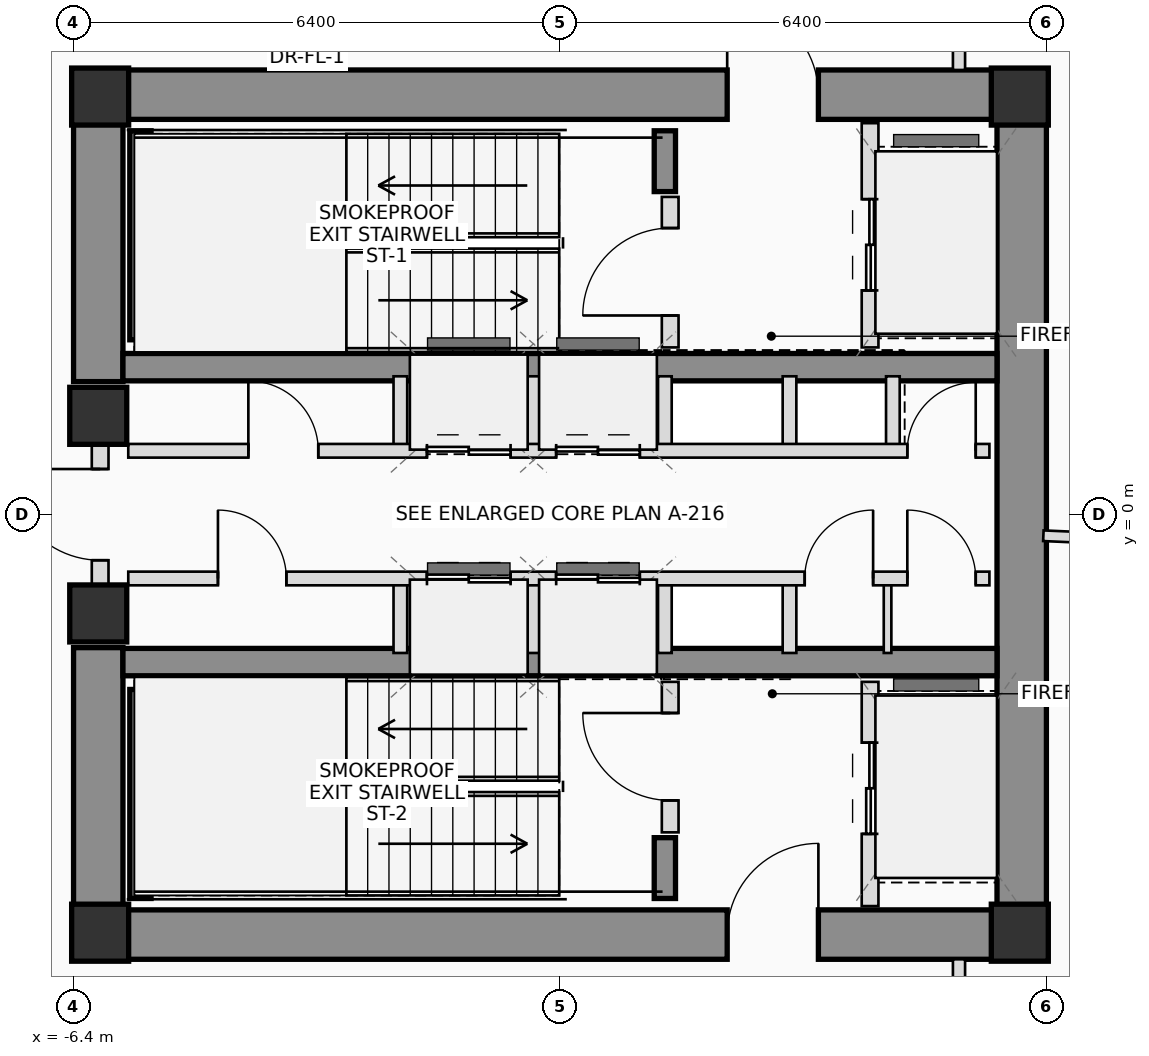
"""IFC4 building model, lengths in metres.
Left out: names, types, materials, properties, quantities, classifications, styles, units other than length and angle.
Written with IfcOpenShell. Run it as: python <this file> out.ifc"""

import sys

from ifc_helpers import new_model, si_unit, direction, frame, frame_2d, origin, origin_2d, place, context, subcontext, project, spatial, rectangle, extrude, source, transform, mapped, element, fill, save


model = new_model("IFC4")
c1 = context("Model", 3, precision=1e-05, world=origin(), true_north=direction((0.0, 1.0)))
c2 = subcontext(c1, "Body", "Model", "MODEL_VIEW")
j1 = project(units=[si_unit("LENGTHUNIT", "METRE"), si_unit("PLANEANGLEUNIT", "RADIAN")], contexts=[c1])
p1 = place(None, origin())
s1 = spatial("IfcSite", under=j1, at=p1, CompositionType="ELEMENT")
p2 = place(p1, origin())
s2 = spatial("IfcBuilding", under=s1, at=p2, CompositionType="ELEMENT")
p3 = place(p2, frame((0.0, 0.0, 172.55)))
s3 = spatial("IfcBuildingStorey", under=s2, at=p3, CompositionType="ELEMENT", Elevation=172.55)
m1 = source(origin(), c2, "Body", "SweptSolid", [
    extrude(rectangle(XDim=0.75, YDim=0.75, at=origin_2d()), origin(), (0.0, 0.0, 1.0), 3.45),
])
for number, where, z_axis, x_axis in (
    (1, (-6.05, -5.5, 0.0), (0.0, 0.0, 1.0), (1.0, 0.0, 0.0)),
    (2, (6.05, -5.5, 0.0), (0.0, 0.0, 1.0), (1.0, 0.0, 0.0)),
    (3, (6.05, 5.5, 0.0), (0.0, 0.0, 1.0), (1.0, 0.0, 0.0)),
    (4, (-6.05, 5.5, 0.0), (0.0, 0.0, 1.0), (1.0, 0.0, 0.0)),
):
    element("IfcColumn", number, at=place(p3, frame(where, z_axis=z_axis, x_axis=x_axis)), inside=s3, PredefinedType="COLUMN", context=c2, shape_type="MappedRepresentation", body=[
        mapped(m1, transform((0.0, 0.0, 0.0), scale=1.0)),
    ])
p4 = place(p3, frame((-6.4, 5.525, 0.0), z_axis=(0.0, 0.0, 1.0), x_axis=(1.0, 0.0, 0.0)))
e5 = element("IfcWall", 5, at=p4, inside=s3, PredefinedType="SHEAR", context=c2, shape_type="SweptSolid", body=[
    extrude(rectangle(XDim=12.8, YDim=0.65, at=frame_2d((6.4, 0.0))), origin(), (0.0, 0.0, 1.0), 3.45),
])
p5 = place(p4, frame((8.6, 0.0, 0.0)))
e6 = element("IfcOpeningElement", 6, at=p5, cuts=e5, PredefinedType="OPENING", context=c2, shape_type="SweptSolid", body=[
    extrude(rectangle(XDim=1.2, YDim=2.2, at=frame_2d((0.6, 1.1))), frame((0.0, 0.335, 0.0), z_axis=(0.0, -1.0, 0.0), x_axis=(1.0, 0.0, 0.0)), (0.0, 0.0, 1.0), 0.67),
])
p6 = place(p3, frame((-6.4, -5.525, 0.0), z_axis=(0.0, 0.0, 1.0), x_axis=(1.0, 0.0, 0.0)))
e7 = element("IfcWall", 7, at=p6, inside=s3, PredefinedType="SHEAR", context=c2, shape_type="SweptSolid", body=[
    extrude(rectangle(XDim=12.8, YDim=0.65, at=frame_2d((6.4, 0.0))), origin(), (0.0, 0.0, 1.0), 3.45),
])
p7 = place(p6, frame((8.6, 0.0, 0.0)))
e8 = element("IfcOpeningElement", 8, at=p7, cuts=e7, PredefinedType="OPENING", context=c2, shape_type="SweptSolid", body=[
    extrude(rectangle(XDim=1.2, YDim=2.2, at=frame_2d((0.6, 1.1))), frame((0.0, 0.335, 0.0), z_axis=(0.0, -1.0, 0.0), x_axis=(1.0, 0.0, 0.0)), (0.0, 0.0, 1.0), 0.67),
])
p8 = place(p3, frame((6.075, -5.2, 0.0), z_axis=(0.0, 0.0, 1.0), x_axis=(0.0, 1.0, 0.0)))
e9 = element("IfcWall", 9, at=p8, inside=s3, PredefinedType="SHEAR", context=c2, shape_type="SweptSolid", body=[
    extrude(rectangle(XDim=10.4, YDim=0.65, at=frame_2d((5.2, 0.0))), origin(), (0.0, 0.0, 1.0), 3.45),
])
for number, where, z_axis, x_axis in (
    (10, (-6.075, -5.2, 0.0), (0.0, 0.0, 1.0), (0.0, 1.0, 0.0)),
    (11, (-6.075, 1.75, 0.0), (0.0, 0.0, 1.0), (0.0, 1.0, 0.0)),
):
    element("IfcWall", number, at=place(p3, frame(where, z_axis=z_axis, x_axis=x_axis)), inside=s3, PredefinedType="SHEAR", context=c2, shape_type="SweptSolid", body=[
        extrude(rectangle(XDim=3.45, YDim=0.65, at=frame_2d((1.725, 0.0))), origin(), (0.0, 0.0, 1.0), 3.45),
    ])
for number, where, z_axis, x_axis in (
    (12, (-5.75, 1.94, 0.0), (0.0, 0.0, 1.0), (1.0, 0.0, 0.0)),
    (13, (-5.75, -1.94, 0.0), (0.0, 0.0, 1.0), (1.0, 0.0, 0.0)),
):
    element("IfcWall", number, at=place(p3, frame(where, z_axis=z_axis, x_axis=x_axis)), inside=s3, PredefinedType="SHEAR", context=c2, shape_type="SweptSolid", body=[
        extrude(rectangle(XDim=11.5, YDim=0.36, at=frame_2d((5.75, 0.0))), origin(), (0.0, 0.0, 1.0), 3.45),
    ])
p9 = place(p3, frame((-5.52, 2.3, 0.0), z_axis=(0.0, 0.0, 1.0), x_axis=(0.0, 1.0, 0.0)))
e14 = element("IfcWall", 14, at=p9, inside=s3, PredefinedType="SHEAR", context=c2, shape_type="SweptSolid", body=[
    extrude(rectangle(XDim=2.75, YDim=0.28, at=frame_2d((1.375, 0.0))), origin(), (0.0, 0.0, 1.0), 3.45),
])
p10 = place(p3, frame((1.38, 4.25, 0.0), z_axis=(0.0, 0.0, 1.0), x_axis=(0.0, 1.0, 0.0)))
e15 = element("IfcWall", 15, at=p10, inside=s3, PredefinedType="SHEAR", context=c2, shape_type="SweptSolid", body=[
    extrude(rectangle(XDim=0.8, YDim=0.28, at=frame_2d((0.4, 0.0))), origin(), (0.0, 0.0, 1.0), 3.45),
])
p11 = place(p3, frame((-5.52, -5.05, 0.0), z_axis=(0.0, 0.0, 1.0), x_axis=(0.0, 1.0, 0.0)))
e16 = element("IfcWall", 16, at=p11, inside=s3, PredefinedType="SHEAR", context=c2, shape_type="SweptSolid", body=[
    extrude(rectangle(XDim=2.75, YDim=0.28, at=frame_2d((1.375, 0.0))), origin(), (0.0, 0.0, 1.0), 3.45),
])
p12 = place(p3, frame((1.38, -5.05, 0.0), z_axis=(0.0, 0.0, 1.0), x_axis=(0.0, 1.0, 0.0)))
e17 = element("IfcWall", 17, at=p12, inside=s3, PredefinedType="SHEAR", context=c2, shape_type="SweptSolid", body=[
    extrude(rectangle(XDim=0.8, YDim=0.28, at=frame_2d((0.4, 0.0))), origin(), (0.0, 0.0, 1.0), 3.45),
])
for number, where, z_axis, x_axis in (
    (18, (-6.075, -1.3, 0.0), (0.0, 0.0, 1.0), (1.0, 0.0, 0.0)),
    (19, (-6.075, 1.3, 0.0), (0.0, 0.0, 1.0), (1.0, 0.0, 0.0)),
):
    element("IfcColumn", number, at=place(p3, frame(where, z_axis=z_axis, x_axis=x_axis)), inside=s3, PredefinedType="COLUMN", context=c2, shape_type="MappedRepresentation", body=[
        mapped(m1, transform((0.0, 0.0, 0.0), scale=1.0)),
    ])
p13 = place(p3, frame((-6.05, -0.95, 0.0), z_axis=(0.0, 0.0, 1.0), x_axis=(0.0, 1.0, 0.0)))
e20 = element("IfcWall", 20, at=p13, inside=s3, PredefinedType="PLUMBINGWALL", context=c2, shape_type="SweptSolid", body=[
    extrude(rectangle(XDim=1.9, YDim=0.22, at=frame_2d((0.95, 0.0))), origin(), (0.0, 0.0, 1.0), 2.23),
])
p14 = place(p13, frame((0.35, 0.0, 0.0)))
e21 = element("IfcOpeningElement", 21, at=p14, cuts=e20, PredefinedType="OPENING", context=c2, shape_type="SweptSolid", body=[
    extrude(rectangle(XDim=1.2, YDim=2.2, at=frame_2d((0.6, 1.1))), frame((0.0, 0.12, 0.0), z_axis=(0.0, -1.0, 0.0), x_axis=(1.0, 0.0, 0.0)), (0.0, 0.0, 1.0), 0.24),
])
p15 = place(p3, frame((1.45, 2.2, 0.0), z_axis=(0.0, 0.0, 1.0), x_axis=(0.0, 1.0, 0.0)))
e22 = element("IfcWall", 22, at=p15, inside=s3, PredefinedType="PLUMBINGWALL", context=c2, shape_type="SweptSolid", body=[
    extrude(rectangle(XDim=1.98, YDim=0.22, at=frame_2d((0.99, 0.0))), origin(), (0.0, 0.0, 1.0), 3.25),
])
p16 = place(p15, frame((0.42, 0.0, 0.0)))
e23 = element("IfcOpeningElement", 23, at=p16, cuts=e22, PredefinedType="OPENING", context=c2, shape_type="SweptSolid", body=[
    extrude(rectangle(XDim=1.15, YDim=2.15, at=frame_2d((0.575, 1.075))), frame((0.0, 0.12, 0.0), z_axis=(0.0, -1.0, 0.0), x_axis=(1.0, 0.0, 0.0)), (0.0, 0.0, 1.0), 0.24),
])
p17 = place(p3, frame((4.08, 2.2, 0.0), z_axis=(0.0, 0.0, 1.0), x_axis=(0.0, 1.0, 0.0)))
e24 = element("IfcWall", 24, at=p17, inside=s3, PredefinedType="PLUMBINGWALL", context=c2, shape_type="SweptSolid", body=[
    extrude(rectangle(XDim=2.95, YDim=0.22, at=frame_2d((1.475, 0.0))), origin(), (0.0, 0.0, 1.0), 3.25),
])
p18 = place(p17, frame((0.75, 0.0, 0.0)))
e25 = element("IfcOpeningElement", 25, at=p18, cuts=e24, PredefinedType="OPENING", context=c2, shape_type="SweptSolid", body=[
    extrude(rectangle(XDim=1.2, YDim=2.25, at=frame_2d((0.6, 1.125))), frame((0.0, 0.12, 0.0), z_axis=(0.0, -1.0, 0.0), x_axis=(1.0, 0.0, 0.0)), (0.0, 0.0, 1.0), 0.24),
])
p19 = place(p3, frame((1.45, -4.18, 0.0), z_axis=(0.0, 0.0, 1.0), x_axis=(0.0, 1.0, 0.0)))
e26 = element("IfcWall", 26, at=p19, inside=s3, PredefinedType="PLUMBINGWALL", context=c2, shape_type="SweptSolid", body=[
    extrude(rectangle(XDim=1.98, YDim=0.22, at=frame_2d((0.99, 0.0))), origin(), (0.0, 0.0, 1.0), 3.25),
])
p20 = place(p19, frame((0.42, 0.0, 0.0)))
e27 = element("IfcOpeningElement", 27, at=p20, cuts=e26, PredefinedType="OPENING", context=c2, shape_type="SweptSolid", body=[
    extrude(rectangle(XDim=1.15, YDim=2.15, at=frame_2d((0.575, 1.075))), frame((0.0, 0.12, 0.0), z_axis=(0.0, -1.0, 0.0), x_axis=(1.0, 0.0, 0.0)), (0.0, 0.0, 1.0), 0.24),
])
p21 = place(p3, frame((4.08, -5.15, 0.0), z_axis=(0.0, 0.0, 1.0), x_axis=(0.0, 1.0, 0.0)))
e28 = element("IfcWall", 28, at=p21, inside=s3, PredefinedType="PLUMBINGWALL", context=c2, shape_type="SweptSolid", body=[
    extrude(rectangle(XDim=2.95, YDim=0.22, at=frame_2d((1.475, 0.0))), origin(), (0.0, 0.0, 1.0), 3.25),
])
p22 = place(p21, frame((0.95, 0.0, 0.0)))
e29 = element("IfcOpeningElement", 29, at=p22, cuts=e28, PredefinedType="OPENING", context=c2, shape_type="SweptSolid", body=[
    extrude(rectangle(XDim=1.2, YDim=2.25, at=frame_2d((0.6, 1.125))), frame((0.0, 0.12, 0.0), z_axis=(0.0, -1.0, 0.0), x_axis=(1.0, 0.0, 0.0)), (0.0, 0.0, 1.0), 0.24),
])
for number, where, z_axis, x_axis in (
    (30, (-2.1, 0.84, 0.0), (0.0, 0.0, 1.0), (0.0, 1.0, 0.0)),
    (31, (-2.1, -1.82, 0.0), (0.0, 0.0, 1.0), (0.0, 1.0, 0.0)),
    (32, (-0.35, 0.84, 0.0), (0.0, 0.0, 1.0), (0.0, 1.0, 0.0)),
    (33, (-0.35, -1.82, 0.0), (0.0, 0.0, 1.0), (0.0, 1.0, 0.0)),
    (34, (1.38, 0.84, 0.0), (0.0, 0.0, 1.0), (0.0, 1.0, 0.0)),
    (35, (1.38, -1.82, 0.0), (0.0, 0.0, 1.0), (0.0, 1.0, 0.0)),
    (36, (3.02, 0.84, 0.0), (0.0, 0.0, 1.0), (0.0, 1.0, 0.0)),
    (37, (4.38, 0.84, 0.0), (0.0, 0.0, 1.0), (0.0, 1.0, 0.0)),
    (38, (3.02, -1.82, 0.0), (0.0, 0.0, 1.0), (0.0, 1.0, 0.0)),
):
    element("IfcWall", number, at=place(p3, frame(where, z_axis=z_axis, x_axis=x_axis)), inside=s3, PredefinedType="PLUMBINGWALL", context=c2, shape_type="SweptSolid", body=[
        extrude(rectangle(XDim=0.98, YDim=0.18, at=frame_2d((0.49, 0.0))), origin(), (0.0, 0.0, 1.0), 3.25),
    ])
p23 = place(p3, frame((4.31, -1.82, 0.0), z_axis=(0.0, 0.0, 1.0), x_axis=(0.0, 1.0, 0.0)))
e39 = element("IfcWall", 39, at=p23, inside=s3, PredefinedType="PARTITIONING", context=c2, shape_type="SweptSolid", body=[
    extrude(rectangle(XDim=0.98, YDim=0.1, at=frame_2d((0.49, 0.0))), origin(), (0.0, 0.0, 1.0), 3.25),
])
p24 = place(p3, frame((-5.68, 0.84, 0.0), z_axis=(0.0, 0.0, 1.0), x_axis=(1.0, 0.0, 0.0)))
e40 = element("IfcWall", 40, at=p24, inside=s3, PredefinedType="PLUMBINGWALL", context=c2, shape_type="SweptSolid", body=[
    extrude(rectangle(XDim=11.33, YDim=0.18, at=frame_2d((5.665, 0.0))), origin(), (0.0, 0.0, 1.0), 3.25),
])
p25 = place(p24, frame((1.58, 0.0, 0.0)))
e41 = element("IfcOpeningElement", 41, at=p25, cuts=e40, PredefinedType="OPENING", context=c2, shape_type="SweptSolid", body=[
    extrude(rectangle(XDim=0.92, YDim=2.1, at=frame_2d((0.46, 1.05))), frame((0.0, 0.1, 0.0), z_axis=(0.0, -1.0, 0.0), x_axis=(1.0, 0.0, 0.0)), (0.0, 0.0, 1.0), 0.2),
])
p26 = place(p24, frame((3.93, 0.0, 0.0)))
e42 = element("IfcOpeningElement", 42, at=p26, cuts=e40, PredefinedType="OPENING", context=c2, shape_type="SweptSolid", body=[
    extrude(rectangle(XDim=1.1, YDim=2.2, at=frame_2d((0.55, 1.1))), frame((0.0, 0.1, 0.0), z_axis=(0.0, -1.0, 0.0), x_axis=(1.0, 0.0, 0.0)), (0.0, 0.0, 1.0), 0.2),
])
p27 = place(p24, frame((5.63, 0.0, 0.0)))
e43 = element("IfcOpeningElement", 43, at=p27, cuts=e40, PredefinedType="OPENING", context=c2, shape_type="SweptSolid", body=[
    extrude(rectangle(XDim=1.1, YDim=2.2, at=frame_2d((0.55, 1.1))), frame((0.0, 0.1, 0.0), z_axis=(0.0, -1.0, 0.0), x_axis=(1.0, 0.0, 0.0)), (0.0, 0.0, 1.0), 0.2),
])
p28 = place(p24, frame((10.25, 0.0, 0.0)))
e44 = element("IfcOpeningElement", 44, at=p28, cuts=e40, PredefinedType="OPENING", context=c2, shape_type="SweptSolid", body=[
    extrude(rectangle(XDim=0.9, YDim=2.05, at=frame_2d((0.45, 1.025))), frame((0.0, 0.1, 0.0), z_axis=(0.0, -1.0, 0.0), x_axis=(1.0, 0.0, 0.0)), (0.0, 0.0, 1.0), 0.2),
])
p29 = place(p3, frame((-5.68, -0.84, 0.0), z_axis=(0.0, 0.0, 1.0), x_axis=(1.0, 0.0, 0.0)))
e45 = element("IfcWall", 45, at=p29, inside=s3, PredefinedType="PLUMBINGWALL", context=c2, shape_type="SweptSolid", body=[
    extrude(rectangle(XDim=11.33, YDim=0.18, at=frame_2d((5.665, 0.0))), origin(), (0.0, 0.0, 1.0), 3.25),
])
p30 = place(p29, frame((1.18, 0.0, 0.0)))
e46 = element("IfcOpeningElement", 46, at=p30, cuts=e45, PredefinedType="OPENING", context=c2, shape_type="SweptSolid", body=[
    extrude(rectangle(XDim=0.9, YDim=2.05, at=frame_2d((0.45, 1.025))), frame((0.0, 0.1, 0.0), z_axis=(0.0, -1.0, 0.0), x_axis=(1.0, 0.0, 0.0)), (0.0, 0.0, 1.0), 0.2),
])
p31 = place(p29, frame((3.93, 0.0, 0.0)))
e47 = element("IfcOpeningElement", 47, at=p31, cuts=e45, PredefinedType="OPENING", context=c2, shape_type="SweptSolid", body=[
    extrude(rectangle(XDim=1.1, YDim=2.2, at=frame_2d((0.55, 1.1))), frame((0.0, 0.1, 0.0), z_axis=(0.0, -1.0, 0.0), x_axis=(1.0, 0.0, 0.0)), (0.0, 0.0, 1.0), 0.2),
])
p32 = place(p29, frame((5.63, 0.0, 0.0)))
e48 = element("IfcOpeningElement", 48, at=p32, cuts=e45, PredefinedType="OPENING", context=c2, shape_type="SweptSolid", body=[
    extrude(rectangle(XDim=1.1, YDim=2.2, at=frame_2d((0.55, 1.1))), frame((0.0, 0.1, 0.0), z_axis=(0.0, -1.0, 0.0), x_axis=(1.0, 0.0, 0.0)), (0.0, 0.0, 1.0), 0.2),
])
p33 = place(p29, frame((8.9, 0.0, 0.0)))
e49 = element("IfcOpeningElement", 49, at=p33, cuts=e45, PredefinedType="OPENING", context=c2, shape_type="SweptSolid", body=[
    extrude(rectangle(XDim=0.9, YDim=2.05, at=frame_2d((0.45, 1.025))), frame((0.0, 0.1, 0.0), z_axis=(0.0, -1.0, 0.0), x_axis=(1.0, 0.0, 0.0)), (0.0, 0.0, 1.0), 0.2),
])
p34 = place(p29, frame((10.25, 0.0, 0.0)))
e50 = element("IfcOpeningElement", 50, at=p34, cuts=e45, PredefinedType="OPENING", context=c2, shape_type="SweptSolid", body=[
    extrude(rectangle(XDim=0.9, YDim=2.05, at=frame_2d((0.45, 1.025))), frame((0.0, 0.1, 0.0), z_axis=(0.0, -1.0, 0.0), x_axis=(1.0, 0.0, 0.0)), (0.0, 0.0, 1.0), 0.2),
])
for number, where, z_axis, x_axis in (
    (51, (5.25, 7.55, 0.0), (0.0, 0.0, 1.0), (0.0, -1.0, 0.0)),
    (52, (5.25, -5.85, 0.0), (0.0, 0.0, 1.0), (0.0, -1.0, 0.0)),
):
    element("IfcWall", number, at=place(p3, frame(where, z_axis=z_axis, x_axis=x_axis)), inside=s3, PredefinedType="PARTITIONING", context=c2, shape_type="SweptSolid", body=[
        extrude(rectangle(XDim=1.7, YDim=0.16, at=frame_2d((0.85, 0.0))), origin(), (0.0, 0.0, 1.0), 3.25),
    ])
p35 = place(p3, frame((6.36, -0.278, 0.0), z_axis=(0.0, 0.0, 1.0), x_axis=(0.999047983793, -0.043624833281, 0.0)))
e53 = element("IfcWall", 53, at=p35, inside=s3, PredefinedType="PARTITIONING", context=c2, shape_type="SweptSolid", body=[
    extrude(rectangle(XDim=6.833, YDim=0.14, at=frame_2d((3.417, 0.0))), origin(), (0.0, 0.0, 1.0), 2.605),
])
p36 = place(p5, origin())
e54 = element("IfcDoor", 54, at=p36, inside=s3, OperationType="SINGLE_SWING_LEFT", PredefinedType="DOOR", context=c2, shape_type="SweptSolid", body=[
    extrude(rectangle(XDim=1.2, YDim=2.2, at=frame_2d((0.6, 1.1))), frame((0.0, 0.025, 0.0), z_axis=(0.0, -1.0, 0.0), x_axis=(1.0, 0.0, 0.0)), (0.0, 0.0, 1.0), 0.05),
])
fill(e6, e54)
p37 = place(p7, origin())
e55 = element("IfcDoor", 55, at=p37, inside=s3, OperationType="SINGLE_SWING_RIGHT", PredefinedType="DOOR", context=c2, shape_type="SweptSolid", body=[
    extrude(rectangle(XDim=1.2, YDim=2.2, at=frame_2d((0.6, 1.1))), frame((0.0, 0.025, 0.0), z_axis=(0.0, -1.0, 0.0), x_axis=(1.0, 0.0, 0.0)), (0.0, 0.0, 1.0), 0.05),
])
fill(e8, e55)
p38 = place(p14, origin())
e56 = element("IfcDoor", 56, at=p38, inside=s3, OperationType="SINGLE_SWING_RIGHT", PredefinedType="DOOR", context=c2, shape_type="SweptSolid", body=[
    extrude(rectangle(XDim=1.2, YDim=2.2, at=frame_2d((0.6, 1.1))), frame((0.0, 0.025, 0.0), z_axis=(0.0, -1.0, 0.0), x_axis=(1.0, 0.0, 0.0)), (0.0, 0.0, 1.0), 0.05),
])
fill(e21, e56)
p39 = place(p16, origin())
e57 = element("IfcDoor", 57, at=p39, inside=s3, OperationType="SINGLE_SWING_LEFT", PredefinedType="DOOR", context=c2, shape_type="SweptSolid", body=[
    extrude(rectangle(XDim=1.15, YDim=2.15, at=frame_2d((0.575, 1.075))), frame((0.0, 0.025, 0.0), z_axis=(0.0, -1.0, 0.0), x_axis=(1.0, 0.0, 0.0)), (0.0, 0.0, 1.0), 0.05),
])
fill(e23, e57)
p40 = place(p18, origin())
e58 = element("IfcDoor", 58, at=p40, inside=s3, OperationType="DOUBLE_DOOR_SLIDING", PredefinedType="DOOR", context=c2, shape_type="SweptSolid", body=[
    extrude(rectangle(XDim=1.2, YDim=2.25, at=frame_2d((0.6, 1.125))), frame((0.0, 0.025, 0.0), z_axis=(0.0, -1.0, 0.0), x_axis=(1.0, 0.0, 0.0)), (0.0, 0.0, 1.0), 0.05),
])
fill(e25, e58)
p41 = place(p20, origin())
e59 = element("IfcDoor", 59, at=p41, inside=s3, OperationType="SINGLE_SWING_RIGHT", PredefinedType="DOOR", context=c2, shape_type="SweptSolid", body=[
    extrude(rectangle(XDim=1.15, YDim=2.15, at=frame_2d((0.575, 1.075))), frame((0.0, 0.025, 0.0), z_axis=(0.0, -1.0, 0.0), x_axis=(1.0, 0.0, 0.0)), (0.0, 0.0, 1.0), 0.05),
])
fill(e27, e59)
p42 = place(p22, origin())
e60 = element("IfcDoor", 60, at=p42, inside=s3, OperationType="DOUBLE_DOOR_SLIDING", PredefinedType="DOOR", context=c2, shape_type="SweptSolid", body=[
    extrude(rectangle(XDim=1.2, YDim=2.25, at=frame_2d((0.6, 1.125))), frame((0.0, 0.025, 0.0), z_axis=(0.0, -1.0, 0.0), x_axis=(1.0, 0.0, 0.0)), (0.0, 0.0, 1.0), 0.05),
])
fill(e29, e60)
p43 = place(p25, origin())
e61 = element("IfcDoor", 61, at=p43, inside=s3, OperationType="SINGLE_SWING_LEFT", PredefinedType="DOOR", context=c2, shape_type="SweptSolid", body=[
    extrude(rectangle(XDim=0.92, YDim=2.1, at=frame_2d((0.46, 1.05))), frame((0.0, 0.025, 0.0), z_axis=(0.0, -1.0, 0.0), x_axis=(1.0, 0.0, 0.0)), (0.0, 0.0, 1.0), 0.05),
])
fill(e41, e61)
p44 = place(p26, origin())
e62 = element("IfcDoor", 62, at=p44, inside=s3, OperationType="DOUBLE_DOOR_SLIDING", PredefinedType="DOOR", context=c2, shape_type="SweptSolid", body=[
    extrude(rectangle(XDim=1.1, YDim=2.2, at=frame_2d((0.55, 1.1))), frame((0.0, 0.025, 0.0), z_axis=(0.0, -1.0, 0.0), x_axis=(1.0, 0.0, 0.0)), (0.0, 0.0, 1.0), 0.05),
])
fill(e42, e62)
p45 = place(p27, origin())
e63 = element("IfcDoor", 63, at=p45, inside=s3, OperationType="DOUBLE_DOOR_SLIDING", PredefinedType="DOOR", context=c2, shape_type="SweptSolid", body=[
    extrude(rectangle(XDim=1.1, YDim=2.2, at=frame_2d((0.55, 1.1))), frame((0.0, 0.025, 0.0), z_axis=(0.0, -1.0, 0.0), x_axis=(1.0, 0.0, 0.0)), (0.0, 0.0, 1.0), 0.05),
])
fill(e43, e63)
p46 = place(p28, origin())
e64 = element("IfcDoor", 64, at=p46, inside=s3, OperationType="SINGLE_SWING_RIGHT", PredefinedType="DOOR", context=c2, shape_type="SweptSolid", body=[
    extrude(rectangle(XDim=0.9, YDim=2.05, at=frame_2d((0.45, 1.025))), frame((0.0, 0.025, 0.0), z_axis=(0.0, -1.0, 0.0), x_axis=(1.0, 0.0, 0.0)), (0.0, 0.0, 1.0), 0.05),
])
fill(e44, e64)
p47 = place(p30, origin())
e65 = element("IfcDoor", 65, at=p47, inside=s3, OperationType="SINGLE_SWING_LEFT", PredefinedType="DOOR", context=c2, shape_type="SweptSolid", body=[
    extrude(rectangle(XDim=0.9, YDim=2.05, at=frame_2d((0.45, 1.025))), frame((0.0, 0.025, 0.0), z_axis=(0.0, -1.0, 0.0), x_axis=(1.0, 0.0, 0.0)), (0.0, 0.0, 1.0), 0.05),
])
fill(e46, e65)
p48 = place(p31, origin())
e66 = element("IfcDoor", 66, at=p48, inside=s3, OperationType="DOUBLE_DOOR_SLIDING", PredefinedType="DOOR", context=c2, shape_type="SweptSolid", body=[
    extrude(rectangle(XDim=1.1, YDim=2.2, at=frame_2d((0.55, 1.1))), frame((0.0, 0.025, 0.0), z_axis=(0.0, -1.0, 0.0), x_axis=(1.0, 0.0, 0.0)), (0.0, 0.0, 1.0), 0.05),
])
fill(e47, e66)
p49 = place(p32, origin())
e67 = element("IfcDoor", 67, at=p49, inside=s3, OperationType="DOUBLE_DOOR_SLIDING", PredefinedType="DOOR", context=c2, shape_type="SweptSolid", body=[
    extrude(rectangle(XDim=1.1, YDim=2.2, at=frame_2d((0.55, 1.1))), frame((0.0, 0.025, 0.0), z_axis=(0.0, -1.0, 0.0), x_axis=(1.0, 0.0, 0.0)), (0.0, 0.0, 1.0), 0.05),
])
fill(e48, e67)
p50 = place(p33, origin())
e68 = element("IfcDoor", 68, at=p50, inside=s3, OperationType="SINGLE_SWING_RIGHT", PredefinedType="DOOR", context=c2, shape_type="SweptSolid", body=[
    extrude(rectangle(XDim=0.9, YDim=2.05, at=frame_2d((0.45, 1.025))), frame((0.0, 0.025, 0.0), z_axis=(0.0, -1.0, 0.0), x_axis=(1.0, 0.0, 0.0)), (0.0, 0.0, 1.0), 0.05),
])
fill(e49, e68)
p51 = place(p34, origin())
e69 = element("IfcDoor", 69, at=p51, inside=s3, OperationType="SINGLE_SWING_LEFT", PredefinedType="DOOR", context=c2, shape_type="SweptSolid", body=[
    extrude(rectangle(XDim=0.9, YDim=2.05, at=frame_2d((0.45, 1.025))), frame((0.0, 0.025, 0.0), z_axis=(0.0, -1.0, 0.0), x_axis=(1.0, 0.0, 0.0)), (0.0, 0.0, 1.0), 0.05),
])
fill(e50, e69)
save(model, sys.argv[1])
